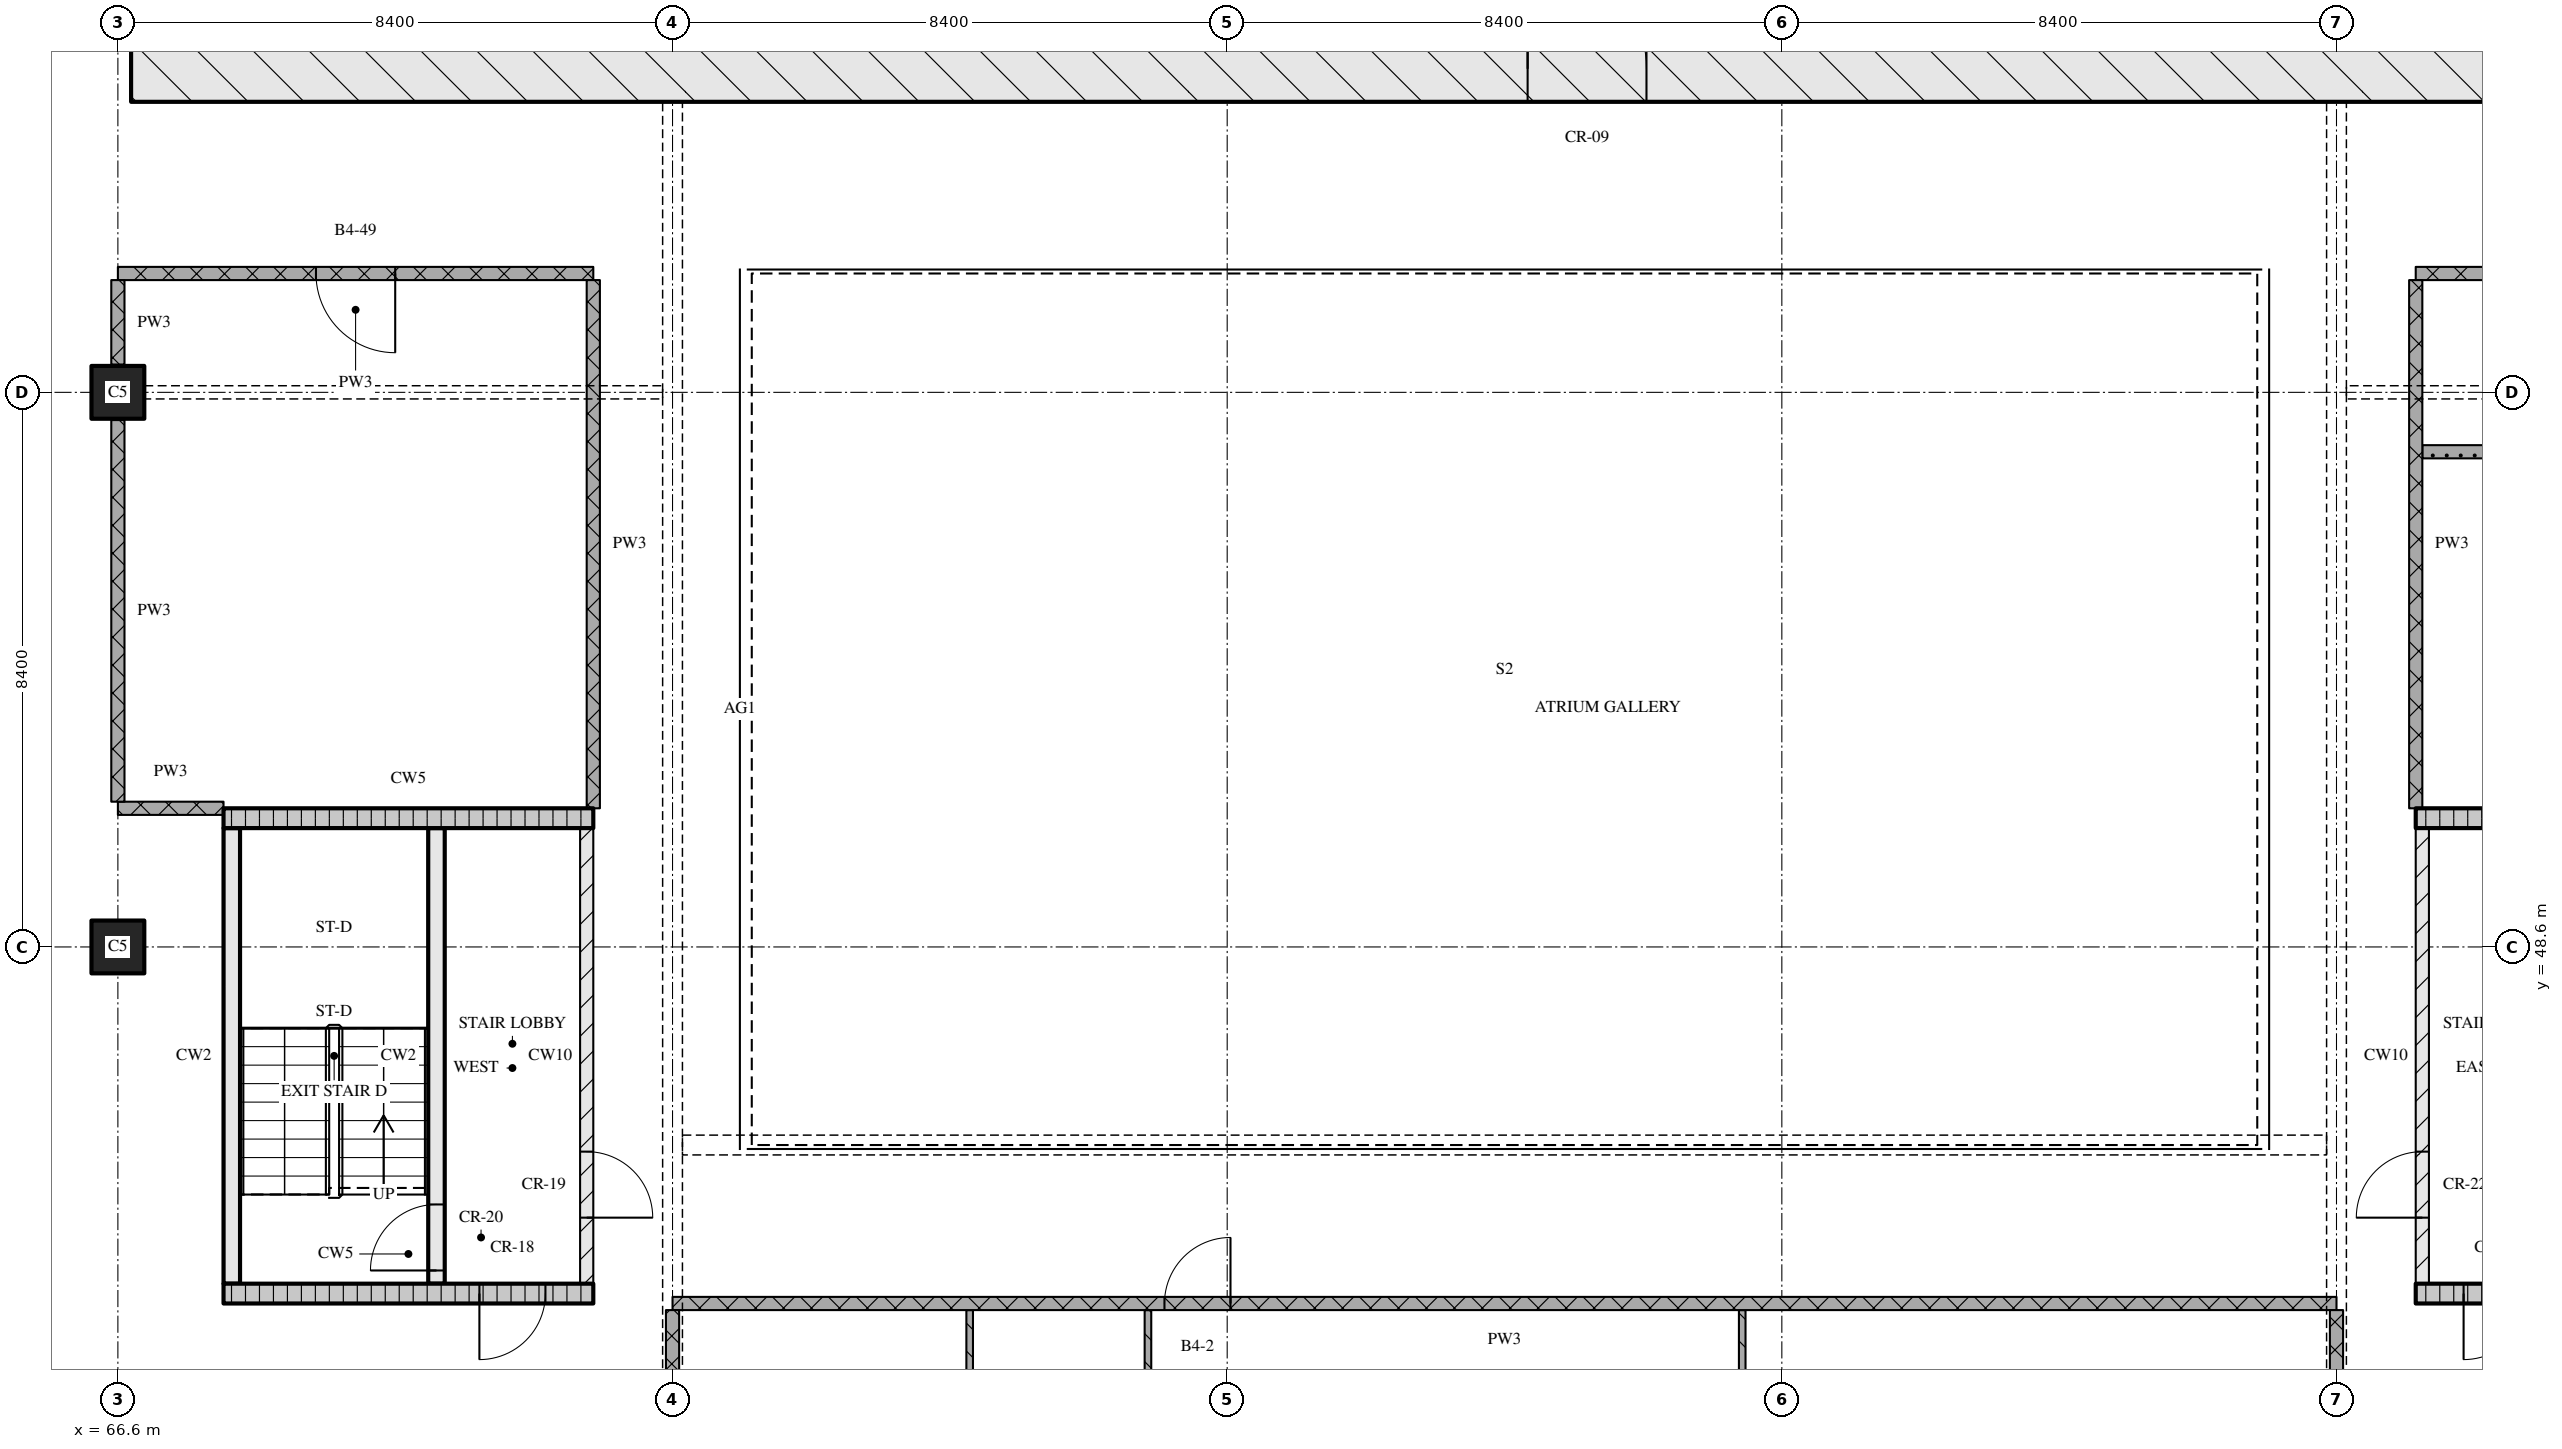
"""IFC4 building model, lengths in metres.
Left out: names, types, materials, properties, quantities, classifications, styles, units other than length and angle.
Written with IfcOpenShell. Run it as: python <this file> out.ifc"""

import sys

from ifc_helpers import new_model, si_unit, direction, frame, frame_2d, origin, origin_2d, place, context, subcontext, project, spatial, rectangle, extrude, element, fill, save


model = new_model("IFC4")
c1 = context("Model", 3, precision=1e-05, world=origin(), true_north=direction((0.0, 1.0)))
c2 = subcontext(c1, "Body", "Model", "MODEL_VIEW")
j1 = project(units=[si_unit("LENGTHUNIT", "METRE"), si_unit("PLANEANGLEUNIT", "RADIAN")], contexts=[c1])
p1 = place(None, origin())
s1 = spatial("IfcSite", under=j1, at=p1, CompositionType="ELEMENT")
p2 = place(p1, origin())
s2 = spatial("IfcBuilding", under=s1, at=p2, CompositionType="ELEMENT")
p3 = place(p2, frame((0.0, 0.0, 134.85)))
s3 = spatial("IfcBuildingStorey", under=s2, at=p3, CompositionType="ELEMENT", Elevation=134.85)
for number, where, z_axis, x_axis in (
    (1, (66.6, 48.6, 0.0), (0.0, 0.0, 1.0), (1.0, 0.0, 0.0)),
    (2, (66.6, 57.0, 0.0), (0.0, 0.0, 1.0), (1.0, 0.0, 0.0)),
):
    element("IfcColumn", number, at=place(p3, frame(where, z_axis=z_axis, x_axis=x_axis)), inside=s3, PredefinedType="COLUMN", context=c2, shape_type="SweptSolid", body=[
        extrude(rectangle(XDim=0.8, YDim=0.8, at=origin_2d()), origin(), (0.0, 0.0, 1.0), 3.6),
    ])
p4 = place(p3, frame((66.8, 61.9, 0.0), z_axis=(0.0, 0.0, 1.0), x_axis=(1.0, 0.0, 0.0)))
e3 = element("IfcWall", 3, at=p4, inside=s3, PredefinedType="SOLIDWALL", context=c2, shape_type="SweptSolid", body=[
    extrude(rectangle(XDim=41.6, YDim=1.0, at=frame_2d((20.8, 0.0))), origin(), (0.0, 0.0, 1.0), 3.32),
])
p5 = place(p4, frame((21.15, 0.0, 0.0)))
e4 = element("IfcOpeningElement", 4, at=p5, cuts=e3, PredefinedType="OPENING", context=c2, shape_type="SweptSolid", body=[
    extrude(rectangle(XDim=1.8, YDim=2.1, at=frame_2d((0.9, 1.05))), frame((0.0, 0.51, 0.0), z_axis=(0.0, -1.0, 0.0), x_axis=(1.0, 0.0, 0.0)), (0.0, 0.0, 1.0), 1.02),
])
p6 = place(p3, frame((68.2, 43.35, 0.0), z_axis=(0.0, 0.0, 1.0), x_axis=(1.0, 0.0, 0.0)))
e5 = element("IfcWall", 5, at=p6, inside=s3, PredefinedType="SOLIDWALL", context=c2, shape_type="SweptSolid", body=[
    extrude(rectangle(XDim=5.6, YDim=0.3, at=frame_2d((2.8, 0.0))), origin(), (0.0, 0.0, 1.0), 3.32),
])
p7 = place(p6, frame((3.875, 0.0, 0.0)))
e6 = element("IfcOpeningElement", 6, at=p7, cuts=e5, PredefinedType="OPENING", context=c2, shape_type="SweptSolid", body=[
    extrude(rectangle(XDim=1.0, YDim=2.1, at=frame_2d((0.5, 1.05))), frame((0.0, 0.16, 0.0), z_axis=(0.0, -1.0, 0.0), x_axis=(1.0, 0.0, 0.0)), (0.0, 0.0, 1.0), 0.32),
])
p8 = place(p3, frame((68.325, 43.5, 0.0), z_axis=(0.0, 0.0, 1.0), x_axis=(0.0, 1.0, 0.0)))
e7 = element("IfcWall", 7, at=p8, inside=s3, PredefinedType="SOLIDWALL", context=c2, shape_type="SweptSolid", body=[
    extrude(rectangle(XDim=6.9, YDim=0.25, at=frame_2d((3.45, 0.0))), origin(), (0.0, 0.0, 1.0), 3.32),
])
p9 = place(p3, frame((71.425, 43.5, 0.0), z_axis=(0.0, 0.0, 1.0), x_axis=(0.0, 1.0, 0.0)))
e8 = element("IfcWall", 8, at=p9, inside=s3, PredefinedType="SOLIDWALL", context=c2, shape_type="SweptSolid", body=[
    extrude(rectangle(XDim=6.9, YDim=0.25, at=frame_2d((3.45, 0.0))), origin(), (0.0, 0.0, 1.0), 3.32),
])
p10 = place(p9, frame((0.2, 0.0, 0.0)))
e9 = element("IfcOpeningElement", 9, at=p10, cuts=e8, PredefinedType="OPENING", context=c2, shape_type="SweptSolid", body=[
    extrude(rectangle(XDim=1.0, YDim=2.1, at=frame_2d((0.5, 1.05))), frame((0.0, 0.135, 0.0), z_axis=(0.0, -1.0, 0.0), x_axis=(1.0, 0.0, 0.0)), (0.0, 0.0, 1.0), 0.27),
])
p11 = place(p3, frame((73.7, 43.5, 0.0), z_axis=(0.0, 0.0, 1.0), x_axis=(0.0, 1.0, 0.0)))
e10 = element("IfcWall", 10, at=p11, inside=s3, PredefinedType="PARTITIONING", context=c2, shape_type="SweptSolid", body=[
    extrude(rectangle(XDim=6.9, YDim=0.2, at=frame_2d((3.45, 0.0))), origin(), (0.0, 0.0, 1.0), 3.32),
])
p12 = place(p11, frame((1.0, 0.0, 0.0)))
e11 = element("IfcOpeningElement", 11, at=p12, cuts=e10, PredefinedType="OPENING", context=c2, shape_type="SweptSolid", body=[
    extrude(rectangle(XDim=1.0, YDim=2.1, at=frame_2d((0.5, 1.05))), frame((0.0, 0.11, 0.0), z_axis=(0.0, -1.0, 0.0), x_axis=(1.0, 0.0, 0.0)), (0.0, 0.0, 1.0), 0.22),
])
p13 = place(p3, frame((68.2, 50.55, 0.0), z_axis=(0.0, 0.0, 1.0), x_axis=(1.0, 0.0, 0.0)))
e12 = element("IfcWall", 12, at=p13, inside=s3, PredefinedType="SOLIDWALL", context=c2, shape_type="SweptSolid", body=[
    extrude(rectangle(XDim=5.6, YDim=0.3, at=frame_2d((2.8, 0.0))), origin(), (0.0, 0.0, 1.0), 3.32),
])
p14 = place(p3, frame((101.4, 43.35, 0.0), z_axis=(0.0, 0.0, 1.0), x_axis=(1.0, 0.0, 0.0)))
e13 = element("IfcWall", 13, at=p14, inside=s3, PredefinedType="SOLIDWALL", context=c2, shape_type="SweptSolid", body=[
    extrude(rectangle(XDim=5.6, YDim=0.3, at=frame_2d((2.8, 0.0))), origin(), (0.0, 0.0, 1.0), 3.32),
])
p15 = place(p14, frame((0.725, 0.0, 0.0)))
e14 = element("IfcOpeningElement", 14, at=p15, cuts=e13, PredefinedType="OPENING", context=c2, shape_type="SweptSolid", body=[
    extrude(rectangle(XDim=1.0, YDim=2.1, at=frame_2d((0.5, 1.05))), frame((0.0, 0.16, 0.0), z_axis=(0.0, -1.0, 0.0), x_axis=(1.0, 0.0, 0.0)), (0.0, 0.0, 1.0), 0.32),
])
p16 = place(p3, frame((101.5, 43.5, 0.0), z_axis=(0.0, 0.0, 1.0), x_axis=(0.0, 1.0, 0.0)))
e15 = element("IfcWall", 15, at=p16, inside=s3, PredefinedType="PARTITIONING", context=c2, shape_type="SweptSolid", body=[
    extrude(rectangle(XDim=6.9, YDim=0.2, at=frame_2d((3.45, 0.0))), origin(), (0.0, 0.0, 1.0), 3.32),
])
p17 = place(p16, frame((1.0, 0.0, 0.0)))
e16 = element("IfcOpeningElement", 16, at=p17, cuts=e15, PredefinedType="OPENING", context=c2, shape_type="SweptSolid", body=[
    extrude(rectangle(XDim=1.0, YDim=2.1, at=frame_2d((0.5, 1.05))), frame((0.0, 0.11, 0.0), z_axis=(0.0, -1.0, 0.0), x_axis=(1.0, 0.0, 0.0)), (0.0, 0.0, 1.0), 0.22),
])
p18 = place(p3, frame((101.4, 50.55, 0.0), z_axis=(0.0, 0.0, 1.0), x_axis=(1.0, 0.0, 0.0)))
e17 = element("IfcWall", 17, at=p18, inside=s3, PredefinedType="SOLIDWALL", context=c2, shape_type="SweptSolid", body=[
    extrude(rectangle(XDim=5.6, YDim=0.3, at=frame_2d((2.8, 0.0))), origin(), (0.0, 0.0, 1.0), 3.32),
])
p19 = place(p3, frame((100.2, 43.2, 0.0), z_axis=(0.0, 0.0, 1.0), x_axis=(-1.0, 0.0, 0.0)))
e18 = element("IfcWall", 18, at=p19, inside=s3, PredefinedType="PARTITIONING", context=c2, shape_type="SweptSolid", body=[
    extrude(rectangle(XDim=25.2, YDim=0.2, at=frame_2d((12.6, 0.0))), origin(), (0.0, 0.0, 1.0), 3.32),
])
p20 = place(p19, frame((16.75, 0.0, 0.0)))
e19 = element("IfcOpeningElement", 19, at=p20, cuts=e18, PredefinedType="OPENING", context=c2, shape_type="SweptSolid", body=[
    extrude(rectangle(XDim=1.0, YDim=2.1, at=frame_2d((0.5, 1.05))), frame((0.0, 0.11, 0.0), z_axis=(0.0, -1.0, 0.0), x_axis=(1.0, 0.0, 0.0)), (0.0, 0.0, 1.0), 0.22),
])
p21 = place(p3, frame((66.6, 50.7, 0.0), z_axis=(0.0, 0.0, 1.0), x_axis=(1.0, 0.0, 0.0)))
e20 = element("IfcWall", 20, at=p21, inside=s3, PredefinedType="PARTITIONING", context=c2, shape_type="SweptSolid", body=[
    extrude(rectangle(XDim=1.6, YDim=0.2, at=frame_2d((0.8, 0.0))), origin(), (0.0, 0.0, 1.0), 3.32),
])
p22 = place(p3, frame((101.5, 56.1, 0.0), z_axis=(0.0, 0.0, 1.0), x_axis=(1.0, 0.0, 0.0)))
e21 = element("IfcWall", 21, at=p22, inside=s3, PredefinedType="PARTITIONING", context=c2, shape_type="SweptSolid", body=[
    extrude(rectangle(XDim=7.0, YDim=0.2, at=frame_2d((3.5, 0.0))), origin(), (0.0, 0.0, 1.0), 3.32),
])
p23 = place(p3, frame((73.8, 58.8, 0.0), z_axis=(0.0, 0.0, 1.0), x_axis=(-1.0, 0.0, 0.0)))
e22 = element("IfcWall", 22, at=p23, inside=s3, PredefinedType="PARTITIONING", context=c2, shape_type="SweptSolid", body=[
    extrude(rectangle(XDim=7.2, YDim=0.2, at=frame_2d((3.6, 0.0))), origin(), (0.0, 0.0, 1.0), 3.32),
])
p24 = place(p23, frame((3.0, 0.0, 0.0)))
e23 = element("IfcOpeningElement", 23, at=p24, cuts=e22, PredefinedType="OPENING", context=c2, shape_type="SweptSolid", body=[
    extrude(rectangle(XDim=1.2, YDim=2.1, at=frame_2d((0.6, 1.05))), frame((0.0, 0.11, 0.0), z_axis=(0.0, -1.0, 0.0), x_axis=(1.0, 0.0, 0.0)), (0.0, 0.0, 1.0), 0.22),
])
p25 = place(p3, frame((101.4, 58.8, 0.0), z_axis=(0.0, 0.0, 1.0), x_axis=(1.0, 0.0, 0.0)))
e24 = element("IfcWall", 24, at=p25, inside=s3, PredefinedType="PARTITIONING", context=c2, shape_type="SweptSolid", body=[
    extrude(rectangle(XDim=7.2, YDim=0.2, at=frame_2d((3.6, 0.0))), origin(), (0.0, 0.0, 1.0), 3.32),
])
p26 = place(p3, frame((66.6, 56.58, 0.0), z_axis=(0.0, 0.0, 1.0), x_axis=(0.0, -1.0, 0.0)))
e25 = element("IfcWall", 25, at=p26, inside=s3, PredefinedType="PARTITIONING", context=c2, shape_type="SweptSolid", body=[
    extrude(rectangle(XDim=5.78, YDim=0.2, at=frame_2d((2.89, 0.0))), origin(), (0.0, 0.0, 1.0), 3.32),
])
p27 = place(p3, frame((66.6, 58.7, 0.0), z_axis=(0.0, 0.0, 1.0), x_axis=(0.0, -1.0, 0.0)))
e26 = element("IfcWall", 26, at=p27, inside=s3, PredefinedType="PARTITIONING", context=c2, shape_type="SweptSolid", body=[
    extrude(rectangle(XDim=1.28, YDim=0.2, at=frame_2d((0.64, 0.0))), origin(), (0.0, 0.0, 1.0), 3.32),
])
p28 = place(p3, frame((73.8, 58.7, 0.0), z_axis=(0.0, 0.0, 1.0), x_axis=(0.0, -1.0, 0.0)))
e27 = element("IfcWall", 27, at=p28, inside=s3, PredefinedType="PARTITIONING", context=c2, shape_type="SweptSolid", body=[
    extrude(rectangle(XDim=8.0, YDim=0.2, at=frame_2d((4.0, 0.0))), origin(), (0.0, 0.0, 1.0), 3.32),
])
p29 = place(p3, frame((75.0, 43.1, 0.0), z_axis=(0.0, 0.0, 1.0), x_axis=(0.0, -1.0, 0.0)))
e28 = element("IfcWall", 28, at=p29, inside=s3, PredefinedType="PARTITIONING", context=c2, shape_type="SweptSolid", body=[
    extrude(rectangle(XDim=2.2, YDim=0.2, at=frame_2d((1.1, 0.0))), origin(), (0.0, 0.0, 1.0), 2.43),
])
p30 = place(p3, frame((79.5, 43.1, 0.0), z_axis=(0.0, 0.0, 1.0), x_axis=(0.0, -1.0, 0.0)))
e29 = element("IfcWall", 29, at=p30, inside=s3, PredefinedType="PARTITIONING", context=c2, shape_type="SweptSolid", body=[
    extrude(rectangle(XDim=4.35, YDim=0.1, at=frame_2d((2.175, 0.0))), origin(), (0.0, 0.0, 1.0), 3.32),
])
p31 = place(p3, frame((82.2, 38.75, 0.0), z_axis=(0.0, 0.0, 1.0), x_axis=(0.0, 1.0, 0.0)))
e30 = element("IfcWall", 30, at=p31, inside=s3, PredefinedType="PARTITIONING", context=c2, shape_type="SweptSolid", body=[
    extrude(rectangle(XDim=4.35, YDim=0.1, at=frame_2d((2.175, 0.0))), origin(), (0.0, 0.0, 1.0), 3.32),
])
p32 = place(p31, frame((1.95, 0.0, 0.0)))
e31 = element("IfcOpeningElement", 31, at=p32, cuts=e30, PredefinedType="OPENING", context=c2, shape_type="SweptSolid", body=[
    extrude(rectangle(XDim=0.8, YDim=2.1, at=frame_2d((0.4, 1.05))), frame((0.0, 0.06, 0.0), z_axis=(0.0, -1.0, 0.0), x_axis=(1.0, 0.0, 0.0)), (0.0, 0.0, 1.0), 0.12),
])
p33 = place(p3, frame((91.2, 43.1, 0.0), z_axis=(0.0, 0.0, 1.0), x_axis=(0.0, -1.0, 0.0)))
e32 = element("IfcWall", 32, at=p33, inside=s3, PredefinedType="PARTITIONING", context=c2, shape_type="SweptSolid", body=[
    extrude(rectangle(XDim=4.35, YDim=0.1, at=frame_2d((2.175, 0.0))), origin(), (0.0, 0.0, 1.0), 3.32),
])
p34 = place(p3, frame((100.2, 43.1, 0.0), z_axis=(0.0, 0.0, 1.0), x_axis=(0.0, -1.0, 0.0)))
e33 = element("IfcWall", 33, at=p34, inside=s3, PredefinedType="PARTITIONING", context=c2, shape_type="SweptSolid", body=[
    extrude(rectangle(XDim=2.2, YDim=0.2, at=frame_2d((1.1, 0.0))), origin(), (0.0, 0.0, 1.0), 2.43),
])
p35 = place(p3, frame((101.4, 58.7, 0.0), z_axis=(0.0, 0.0, 1.0), x_axis=(0.0, -1.0, 0.0)))
e34 = element("IfcWall", 34, at=p35, inside=s3, PredefinedType="PARTITIONING", context=c2, shape_type="SweptSolid", body=[
    extrude(rectangle(XDim=8.0, YDim=0.2, at=frame_2d((4.0, 0.0))), origin(), (0.0, 0.0, 1.0), 3.32),
])
p36 = place(p5, origin())
e35 = element("IfcDoor", 35, at=p36, inside=s3, OperationType="DOUBLE_DOOR_SINGLE_SWING", PredefinedType="DOOR", context=c2, shape_type="SweptSolid", body=[
    extrude(rectangle(XDim=1.8, YDim=2.1, at=frame_2d((0.9, 1.05))), frame((0.0, 0.025, 0.0), z_axis=(0.0, -1.0, 0.0), x_axis=(1.0, 0.0, 0.0)), (0.0, 0.0, 1.0), 0.05),
])
fill(e4, e35)
p37 = place(p7, origin())
e36 = element("IfcDoor", 36, at=p37, inside=s3, OperationType="SINGLE_SWING_RIGHT", PredefinedType="DOOR", context=c2, shape_type="SweptSolid", body=[
    extrude(rectangle(XDim=1.0, YDim=2.1, at=frame_2d((0.5, 1.05))), frame((0.0, 0.025, 0.0), z_axis=(0.0, -1.0, 0.0), x_axis=(1.0, 0.0, 0.0)), (0.0, 0.0, 1.0), 0.05),
])
fill(e6, e36)
p38 = place(p10, origin())
e37 = element("IfcDoor", 37, at=p38, inside=s3, OperationType="SINGLE_SWING_LEFT", PredefinedType="DOOR", context=c2, shape_type="SweptSolid", body=[
    extrude(rectangle(XDim=1.0, YDim=2.1, at=frame_2d((0.5, 1.05))), frame((0.0, 0.025, 0.0), z_axis=(0.0, -1.0, 0.0), x_axis=(1.0, 0.0, 0.0)), (0.0, 0.0, 1.0), 0.05),
])
fill(e9, e37)
p39 = place(p12, origin())
e38 = element("IfcDoor", 38, at=p39, inside=s3, OperationType="SINGLE_SWING_RIGHT", PredefinedType="DOOR", context=c2, shape_type="SweptSolid", body=[
    extrude(rectangle(XDim=1.0, YDim=2.1, at=frame_2d((0.5, 1.05))), frame((0.0, 0.025, 0.0), z_axis=(0.0, -1.0, 0.0), x_axis=(1.0, 0.0, 0.0)), (0.0, 0.0, 1.0), 0.05),
])
fill(e11, e38)
p40 = place(p15, origin())
e39 = element("IfcDoor", 39, at=p40, inside=s3, OperationType="SINGLE_SWING_RIGHT", PredefinedType="DOOR", context=c2, shape_type="SweptSolid", body=[
    extrude(rectangle(XDim=1.0, YDim=2.1, at=frame_2d((0.5, 1.05))), frame((0.0, 0.025, 0.0), z_axis=(0.0, -1.0, 0.0), x_axis=(1.0, 0.0, 0.0)), (0.0, 0.0, 1.0), 0.05),
])
fill(e14, e39)
p41 = place(p17, origin())
e40 = element("IfcDoor", 40, at=p41, inside=s3, OperationType="SINGLE_SWING_LEFT", PredefinedType="DOOR", context=c2, shape_type="SweptSolid", body=[
    extrude(rectangle(XDim=1.0, YDim=2.1, at=frame_2d((0.5, 1.05))), frame((0.0, 0.025, 0.0), z_axis=(0.0, -1.0, 0.0), x_axis=(1.0, 0.0, 0.0)), (0.0, 0.0, 1.0), 0.05),
])
fill(e16, e40)
p42 = place(p20, origin())
e41 = element("IfcDoor", 41, at=p42, inside=s3, OperationType="SINGLE_SWING_RIGHT", PredefinedType="DOOR", context=c2, shape_type="SweptSolid", body=[
    extrude(rectangle(XDim=1.0, YDim=2.1, at=frame_2d((0.5, 1.05))), frame((0.0, 0.025, 0.0), z_axis=(0.0, -1.0, 0.0), x_axis=(1.0, 0.0, 0.0)), (0.0, 0.0, 1.0), 0.05),
])
fill(e19, e41)
p43 = place(p24, origin())
e42 = element("IfcDoor", 42, at=p43, inside=s3, OperationType="SINGLE_SWING_LEFT", PredefinedType="DOOR", context=c2, shape_type="SweptSolid", body=[
    extrude(rectangle(XDim=1.2, YDim=2.1, at=frame_2d((0.6, 1.05))), frame((0.0, 0.025, 0.0), z_axis=(0.0, -1.0, 0.0), x_axis=(1.0, 0.0, 0.0)), (0.0, 0.0, 1.0), 0.05),
])
fill(e23, e42)
save(model, sys.argv[1])
